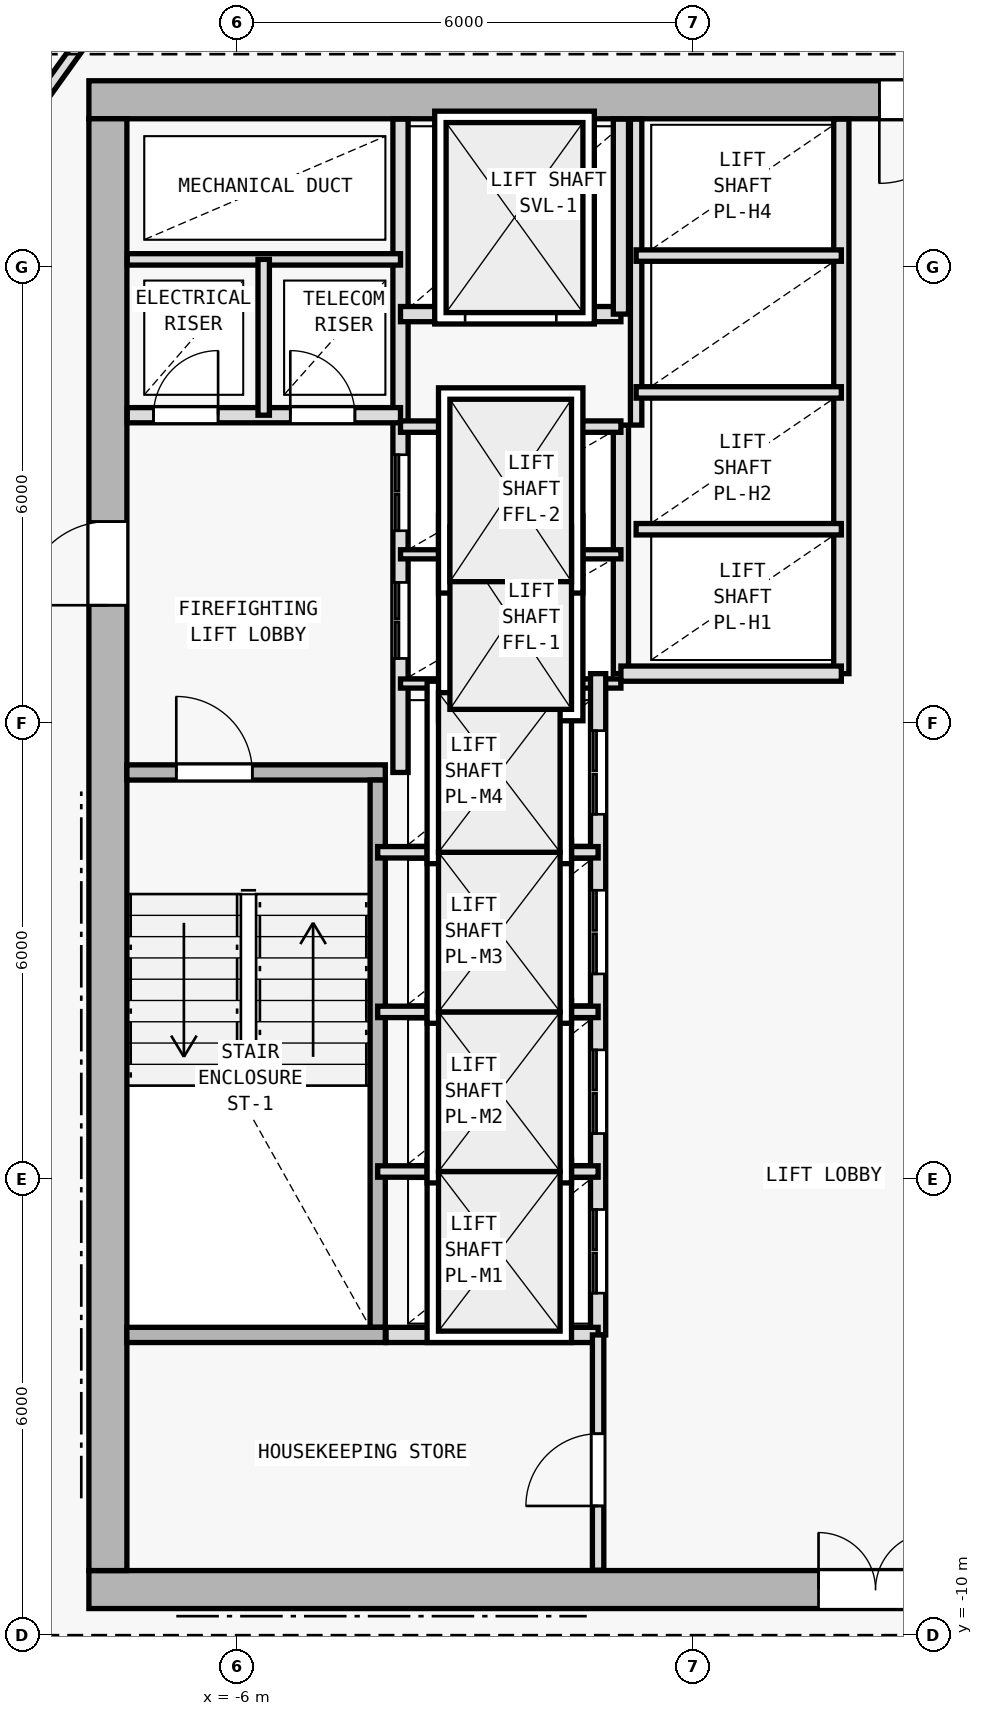
"""IFC4 building model, lengths in metres.
Left out: names, types, materials, properties, quantities, classifications, styles, units other than length and angle.
Written with IfcOpenShell. Run it as: python <this file> out.ifc"""

import sys

from ifc_helpers import new_model, si_unit, direction, frame, frame_2d, origin, origin_2d, place, context, subcontext, project, spatial, rectangle, i_section, extrude, element, fill, save


model = new_model("IFC4")
c1 = context("Model", 3, precision=1e-05, world=origin(), true_north=direction((0.0, 1.0)))
c2 = subcontext(c1, "Body", "Model", "MODEL_VIEW")
j1 = project(units=[si_unit("LENGTHUNIT", "METRE"), si_unit("PLANEANGLEUNIT", "RADIAN")], contexts=[c1])
p1 = place(None, origin())
s1 = spatial("IfcSite", under=j1, at=p1, CompositionType="ELEMENT")
p2 = place(p1, origin())
s2 = spatial("IfcBuilding", under=s1, at=p2, CompositionType="ELEMENT")
p3 = place(p2, frame((0.0, 0.0, 171.0)))
s3 = spatial("IfcBuildingStorey", under=s2, at=p3, CompositionType="ELEMENT", Elevation=171.0)
for number, where, z_axis, x_axis in (
    (1, (-7.7, -9.4, 0.0), (0.0, 0.0, 1.0), (1.0, 0.0, 0.0)),
    (2, (-7.7, 10.2, 0.0), (0.0, 0.0, 1.0), (1.0, 0.0, 0.0)),
    (3, (0.0, -9.4, 0.0), (0.0, 0.0, 1.0), (1.0, 0.0, 0.0)),
    (4, (-7.7, 2.0, 0.0), (0.0, 0.0, 1.0), (1.0, 0.0, 0.0)),
):
    element("IfcColumn", number, at=place(p3, frame(where, z_axis=z_axis, x_axis=x_axis)), inside=s3, PredefinedType="COLUMN", context=c2, shape_type="SweptSolid", body=[
        extrude(i_section(OverallWidth=0.404, OverallDepth=0.407, WebThickness=0.017, FlangeThickness=0.028, FilletRadius=0.015, at=origin_2d()), origin(), (0.0, 0.0, 1.0), 3.6),
    ])
p4 = place(p3, frame((-7.95, -9.4, 0.0), z_axis=(0.0, 0.0, 1.0), x_axis=(1.0, 0.0, 0.0)))
e5 = element("IfcWall", 5, at=p4, inside=s3, PredefinedType="SHEAR", context=c2, shape_type="SweptSolid", body=[
    extrude(rectangle(XDim=15.9, YDim=0.5, at=frame_2d((7.95, 0.0))), origin(), (0.0, 0.0, 1.0), 3.35),
])
p5 = place(p4, frame((9.6, 0.0, 0.0)))
e6 = element("IfcOpeningElement", 6, at=p5, cuts=e5, PredefinedType="OPENING", context=c2, shape_type="SweptSolid", body=[
    extrude(rectangle(XDim=1.5, YDim=2.2, at=frame_2d((0.75, 1.1))), frame((0.0, 0.26, 0.0), z_axis=(0.0, -1.0, 0.0), x_axis=(1.0, 0.0, 0.0)), (0.0, 0.0, 1.0), 0.52),
])
p6 = place(p3, frame((7.95, 10.2, 0.0), z_axis=(0.0, 0.0, 1.0), x_axis=(-1.0, 0.0, 0.0)))
e7 = element("IfcWall", 7, at=p6, inside=s3, PredefinedType="SHEAR", context=c2, shape_type="SweptSolid", body=[
    extrude(rectangle(XDim=15.9, YDim=0.5, at=frame_2d((7.95, 0.0))), origin(), (0.0, 0.0, 1.0), 3.35),
])
p7 = place(p6, frame((4.4, 0.0, 0.0)))
e8 = element("IfcOpeningElement", 8, at=p7, cuts=e7, PredefinedType="OPENING", context=c2, shape_type="SweptSolid", body=[
    extrude(rectangle(XDim=1.1, YDim=2.15, at=frame_2d((0.55, 1.075))), frame((0.0, 0.26, 0.0), z_axis=(0.0, -1.0, 0.0), x_axis=(1.0, 0.0, 0.0)), (0.0, 0.0, 1.0), 0.52),
])
p8 = place(p3, frame((-7.7, -9.15, 0.0), z_axis=(0.0, 0.0, 1.0), x_axis=(0.0, 1.0, 0.0)))
e9 = element("IfcWall", 9, at=p8, inside=s3, PredefinedType="SHEAR", context=c2, shape_type="SweptSolid", body=[
    extrude(rectangle(XDim=19.1, YDim=0.5, at=frame_2d((9.55, 0.0))), origin(), (0.0, 0.0, 1.0), 3.35),
])
p9 = place(p8, frame((12.7, 0.0, 0.0)))
e10 = element("IfcOpeningElement", 10, at=p9, cuts=e9, PredefinedType="OPENING", context=c2, shape_type="SweptSolid", body=[
    extrude(rectangle(XDim=1.1, YDim=2.15, at=frame_2d((0.55, 1.075))), frame((0.0, 0.26, 0.0), z_axis=(0.0, -1.0, 0.0), x_axis=(1.0, 0.0, 0.0)), (0.0, 0.0, 1.0), 0.52),
])
p10 = place(p3, frame((-7.45, 1.35, 0.0), z_axis=(0.0, 0.0, 1.0), x_axis=(1.0, 0.0, 0.0)))
e11 = element("IfcWall", 11, at=p10, inside=s3, PredefinedType="SOLIDWALL", context=c2, shape_type="SweptSolid", body=[
    extrude(rectangle(XDim=3.4, YDim=0.2, at=frame_2d((1.7, 0.0))), origin(), (0.0, 0.0, 1.0), 3.35),
])
p11 = place(p10, frame((0.65, 0.0, 0.0)))
e12 = element("IfcOpeningElement", 12, at=p11, cuts=e11, PredefinedType="OPENING", context=c2, shape_type="SweptSolid", body=[
    extrude(rectangle(XDim=1.0, YDim=2.15, at=frame_2d((0.5, 1.075))), frame((0.0, 0.11, 0.0), z_axis=(0.0, -1.0, 0.0), x_axis=(1.0, 0.0, 0.0)), (0.0, 0.0, 1.0), 0.22),
])
p12 = place(p3, frame((-4.15, -5.95, 0.0), z_axis=(0.0, 0.0, 1.0), x_axis=(0.0, 1.0, 0.0)))
e13 = element("IfcWall", 13, at=p12, inside=s3, PredefinedType="SOLIDWALL", context=c2, shape_type="SweptSolid", body=[
    extrude(rectangle(XDim=7.2, YDim=0.2, at=frame_2d((3.6, 0.0))), origin(), (0.0, 0.0, 1.0), 3.35),
])
p13 = place(p3, frame((-3.85, 1.35, 0.0), z_axis=(0.0, 0.0, 1.0), x_axis=(0.0, 1.0, 0.0)))
e14 = element("IfcWall", 14, at=p13, inside=s3, PredefinedType="SOLIDWALL", context=c2, shape_type="SweptSolid", body=[
    extrude(rectangle(XDim=8.595, YDim=0.2, at=frame_2d((4.297, 0.0))), origin(), (0.0, 0.0, 1.0), 3.35),
])
p14 = place(p13, frame((1.5, 0.0, 0.0)))
e15 = element("IfcOpeningElement", 15, at=p14, cuts=e14, PredefinedType="OPENING", context=c2, shape_type="SweptSolid", body=[
    extrude(rectangle(XDim=1.0, YDim=2.15, at=frame_2d((0.5, 1.075))), frame((0.0, 0.11, 0.0), z_axis=(0.0, -1.0, 0.0), x_axis=(1.0, 0.0, 0.0)), (0.0, 0.0, 1.0), 0.22),
])
p15 = place(p13, frame((3.18, 0.0, 0.0)))
e16 = element("IfcOpeningElement", 16, at=p15, cuts=e14, PredefinedType="OPENING", context=c2, shape_type="SweptSolid", body=[
    extrude(rectangle(XDim=1.0, YDim=2.15, at=frame_2d((0.5, 1.075))), frame((0.0, 0.11, 0.0), z_axis=(0.0, -1.0, 0.0), x_axis=(1.0, 0.0, 0.0)), (0.0, 0.0, 1.0), 0.22),
])
p16 = place(p3, frame((-7.445, 6.05, 0.0), z_axis=(0.0, 0.0, 1.0), x_axis=(1.0, 0.0, 0.0)))
e17 = element("IfcWall", 17, at=p16, inside=s3, PredefinedType="SOLIDWALL", context=c2, shape_type="SweptSolid", body=[
    extrude(rectangle(XDim=3.595, YDim=0.2, at=frame_2d((1.797, 0.0))), origin(), (0.0, 0.0, 1.0), 3.35),
])
p17 = place(p16, frame((0.345, 0.0, 0.0)))
e18 = element("IfcOpeningElement", 18, at=p17, cuts=e17, PredefinedType="OPENING", context=c2, shape_type="SweptSolid", body=[
    extrude(rectangle(XDim=0.85, YDim=2.1, at=frame_2d((0.425, 1.05))), frame((0.0, 0.11, 0.0), z_axis=(0.0, -1.0, 0.0), x_axis=(1.0, 0.0, 0.0)), (0.0, 0.0, 1.0), 0.22),
])
p18 = place(p16, frame((2.145, 0.0, 0.0)))
e19 = element("IfcOpeningElement", 19, at=p18, cuts=e17, PredefinedType="OPENING", context=c2, shape_type="SweptSolid", body=[
    extrude(rectangle(XDim=0.85, YDim=2.1, at=frame_2d((0.425, 1.05))), frame((0.0, 0.11, 0.0), z_axis=(0.0, -1.0, 0.0), x_axis=(1.0, 0.0, 0.0)), (0.0, 0.0, 1.0), 0.22),
])
p19 = place(p3, frame((-7.445, 8.1, 0.0), z_axis=(0.0, 0.0, 1.0), x_axis=(1.0, 0.0, 0.0)))
e20 = element("IfcWall", 20, at=p19, inside=s3, PredefinedType="PARTITIONING", context=c2, shape_type="SweptSolid", body=[
    extrude(rectangle(XDim=3.595, YDim=0.15, at=frame_2d((1.797, 0.0))), origin(), (0.0, 0.0, 1.0), 3.35),
])
p20 = place(p3, frame((-5.65, 6.05, 0.0), z_axis=(0.0, 0.0, 1.0), x_axis=(0.0, 1.0, 0.0)))
e21 = element("IfcWall", 21, at=p20, inside=s3, PredefinedType="PARTITIONING", context=c2, shape_type="SweptSolid", body=[
    extrude(rectangle(XDim=2.05, YDim=0.15, at=frame_2d((1.025, 0.0))), origin(), (0.0, 0.0, 1.0), 3.35),
])
p21 = place(p3, frame((-0.95, 2.65, 0.0), z_axis=(0.0, 0.0, 1.0), x_axis=(0.0, 1.0, 0.0)))
e22 = element("IfcWall", 22, at=p21, inside=s3, PredefinedType="SOLIDWALL", context=c2, shape_type="SweptSolid", body=[
    extrude(rectangle(XDim=3.27, YDim=0.2, at=frame_2d((1.635, 0.0))), origin(), (0.0, 0.0, 1.0), 3.35),
])
for number, where, z_axis, x_axis in (
    (23, (-3.85, 2.52, 0.0), (0.0, 0.0, 1.0), (1.0, 0.0, 0.0)),
    (24, (-3.85, 4.22, 0.0), (0.0, 0.0, 1.0), (1.0, 0.0, 0.0)),
):
    element("IfcWall", number, at=place(p3, frame(where, z_axis=z_axis, x_axis=x_axis)), inside=s3, PredefinedType="PARTITIONING", context=c2, shape_type="SweptSolid", body=[
        extrude(rectangle(XDim=2.9, YDim=0.12, at=frame_2d((1.45, 0.0))), origin(), (0.0, 0.0, 1.0), 3.35),
    ])
p22 = place(p3, frame((-3.85, 5.9, 0.0), z_axis=(0.0, 0.0, 1.0), x_axis=(1.0, 0.0, 0.0)))
e25 = element("IfcWall", 25, at=p22, inside=s3, PredefinedType="PARTITIONING", context=c2, shape_type="SweptSolid", body=[
    extrude(rectangle(XDim=2.9, YDim=0.15, at=frame_2d((1.45, 0.0))), origin(), (0.0, 0.0, 1.0), 3.35),
])
p23 = place(p3, frame((-3.85, 7.38, 0.0), z_axis=(0.0, 0.0, 1.0), x_axis=(1.0, 0.0, 0.0)))
e26 = element("IfcWall", 26, at=p23, inside=s3, PredefinedType="SOLIDWALL", context=c2, shape_type="SweptSolid", body=[
    extrude(rectangle(XDim=2.9, YDim=0.2, at=frame_2d((1.45, 0.0))), origin(), (0.0, 0.0, 1.0), 3.35),
])
p24 = place(p23, frame((0.85, 0.0, 0.0)))
e27 = element("IfcOpeningElement", 27, at=p24, cuts=e26, PredefinedType="OPENING", context=c2, shape_type="SweptSolid", body=[
    extrude(rectangle(XDim=1.2, YDim=2.2, at=frame_2d((0.6, 1.1))), frame((0.0, 0.11, 0.0), z_axis=(0.0, -1.0, 0.0), x_axis=(1.0, 0.0, 0.0)), (0.0, 0.0, 1.0), 0.22),
])
p25 = place(p3, frame((-0.95, 7.38, 0.0), z_axis=(0.0, 0.0, 1.0), x_axis=(0.0, 1.0, 0.0)))
e28 = element("IfcWall", 28, at=p25, inside=s3, PredefinedType="SOLIDWALL", context=c2, shape_type="SweptSolid", body=[
    extrude(rectangle(XDim=2.565, YDim=0.2, at=frame_2d((1.283, 0.0))), origin(), (0.0, 0.0, 1.0), 3.35),
])
p26 = place(p3, frame((-1.25, -6.05, 0.0), z_axis=(0.0, 0.0, 1.0), x_axis=(0.0, 1.0, 0.0)))
e29 = element("IfcWall", 29, at=p26, inside=s3, PredefinedType="SOLIDWALL", context=c2, shape_type="SweptSolid", body=[
    extrude(rectangle(XDim=8.7, YDim=0.2, at=frame_2d((4.35, 0.0))), origin(), (0.0, 0.0, 1.0), 3.35),
])
p27 = place(p26, frame((0.55, 0.0, 0.0)))
e30 = element("IfcOpeningElement", 30, at=p27, cuts=e29, PredefinedType="OPENING", context=c2, shape_type="SweptSolid", body=[
    extrude(rectangle(XDim=1.1, YDim=2.15, at=frame_2d((0.55, 1.075))), frame((0.0, 0.11, 0.0), z_axis=(0.0, -1.0, 0.0), x_axis=(1.0, 0.0, 0.0)), (0.0, 0.0, 1.0), 0.22),
])
p28 = place(p26, frame((2.65, 0.0, 0.0)))
e31 = element("IfcOpeningElement", 31, at=p28, cuts=e29, PredefinedType="OPENING", context=c2, shape_type="SweptSolid", body=[
    extrude(rectangle(XDim=1.1, YDim=2.15, at=frame_2d((0.55, 1.075))), frame((0.0, 0.11, 0.0), z_axis=(0.0, -1.0, 0.0), x_axis=(1.0, 0.0, 0.0)), (0.0, 0.0, 1.0), 0.22),
])
p29 = place(p26, frame((4.75, 0.0, 0.0)))
e32 = element("IfcOpeningElement", 32, at=p29, cuts=e29, PredefinedType="OPENING", context=c2, shape_type="SweptSolid", body=[
    extrude(rectangle(XDim=1.1, YDim=2.15, at=frame_2d((0.55, 1.075))), frame((0.0, 0.11, 0.0), z_axis=(0.0, -1.0, 0.0), x_axis=(1.0, 0.0, 0.0)), (0.0, 0.0, 1.0), 0.22),
])
p30 = place(p26, frame((6.85, 0.0, 0.0)))
e33 = element("IfcOpeningElement", 33, at=p30, cuts=e29, PredefinedType="OPENING", context=c2, shape_type="SweptSolid", body=[
    extrude(rectangle(XDim=1.1, YDim=2.15, at=frame_2d((0.55, 1.075))), frame((0.0, 0.11, 0.0), z_axis=(0.0, -1.0, 0.0), x_axis=(1.0, 0.0, 0.0)), (0.0, 0.0, 1.0), 0.22),
])
for number, where, z_axis, x_axis in (
    (34, (-4.15, -3.9, 0.0), (0.0, 0.0, 1.0), (1.0, 0.0, 0.0)),
    (35, (-4.15, -1.8, 0.0), (0.0, 0.0, 1.0), (1.0, 0.0, 0.0)),
    (36, (-4.15, 0.3, 0.0), (0.0, 0.0, 1.0), (1.0, 0.0, 0.0)),
):
    element("IfcWall", number, at=place(p3, frame(where, z_axis=z_axis, x_axis=x_axis)), inside=s3, PredefinedType="PARTITIONING", context=c2, shape_type="SweptSolid", body=[
        extrude(rectangle(XDim=2.9, YDim=0.15, at=frame_2d((1.45, 0.0))), origin(), (0.0, 0.0, 1.0), 3.35),
    ])
p31 = place(p3, frame((1.95, 2.65, 0.0), z_axis=(0.0, 0.0, 1.0), x_axis=(0.0, 1.0, 0.0)))
e37 = element("IfcWall", 37, at=p31, inside=s3, PredefinedType="SOLIDWALL", context=c2, shape_type="SweptSolid", body=[
    extrude(rectangle(XDim=7.295, YDim=0.2, at=frame_2d((3.647, 0.0))), origin(), (0.0, 0.0, 1.0), 3.35),
])
p32 = place(p3, frame((-0.95, 2.65, 0.0), z_axis=(0.0, 0.0, 1.0), x_axis=(1.0, 0.0, 0.0)))
e38 = element("IfcWall", 38, at=p32, inside=s3, PredefinedType="SOLIDWALL", context=c2, shape_type="SweptSolid", body=[
    extrude(rectangle(XDim=2.9, YDim=0.2, at=frame_2d((1.45, 0.0))), origin(), (0.0, 0.0, 1.0), 3.35),
])
p33 = place(p3, frame((-0.75, 5.92, 0.0), z_axis=(0.0, 0.0, 1.0), x_axis=(0.0, 1.0, 0.0)))
e39 = element("IfcWall", 39, at=p33, inside=s3, PredefinedType="PARTITIONING", context=c2, shape_type="SweptSolid", body=[
    extrude(rectangle(XDim=4.025, YDim=0.15, at=frame_2d((2.013, 0.0))), origin(), (0.0, 0.0, 1.0), 3.35),
])
for number, where, z_axis, x_axis in (
    (40, (-0.75, 4.55, 0.0), (0.0, 0.0, 1.0), (1.0, 0.0, 0.0)),
    (41, (-0.75, 6.35, 0.0), (0.0, 0.0, 1.0), (1.0, 0.0, 0.0)),
    (42, (-0.75, 8.15, 0.0), (0.0, 0.0, 1.0), (1.0, 0.0, 0.0)),
):
    element("IfcWall", number, at=place(p3, frame(where, z_axis=z_axis, x_axis=x_axis)), inside=s3, PredefinedType="PARTITIONING", context=c2, shape_type="SweptSolid", body=[
        extrude(rectangle(XDim=2.7, YDim=0.15, at=frame_2d((1.35, 0.0))), origin(), (0.0, 0.0, 1.0), 3.35),
    ])
p34 = place(p3, frame((-7.45, -6.05, 0.0), z_axis=(0.0, 0.0, 1.0), x_axis=(1.0, 0.0, 0.0)))
e43 = element("IfcWall", 43, at=p34, inside=s3, PredefinedType="SOLIDWALL", context=c2, shape_type="SweptSolid", body=[
    extrude(rectangle(XDim=3.4, YDim=0.2, at=frame_2d((1.7, 0.0))), origin(), (0.0, 0.0, 1.0), 3.35),
])
p35 = place(p3, frame((-4.04, -6.05, 0.0), z_axis=(0.0, 0.0, 1.0), x_axis=(1.0, 0.0, 0.0)))
e44 = element("IfcWall", 44, at=p35, inside=s3, PredefinedType="SOLIDWALL", context=c2, shape_type="SweptSolid", body=[
    extrude(rectangle(XDim=2.79, YDim=0.2, at=frame_2d((1.395, 0.0))), origin(), (0.0, 0.0, 1.0), 3.35),
])
p36 = place(p3, frame((-1.25, -9.145, 0.0), z_axis=(0.0, 0.0, 1.0), x_axis=(0.0, 1.0, 0.0)))
e45 = element("IfcWall", 45, at=p36, inside=s3, PredefinedType="PARTITIONING", context=c2, shape_type="SweptSolid", body=[
    extrude(rectangle(XDim=3.095, YDim=0.15, at=frame_2d((1.547, 0.0))), origin(), (0.0, 0.0, 1.0), 3.35),
])
p37 = place(p36, frame((0.845, 0.0, 0.0)))
e46 = element("IfcOpeningElement", 46, at=p37, cuts=e45, PredefinedType="OPENING", context=c2, shape_type="SweptSolid", body=[
    extrude(rectangle(XDim=0.95, YDim=2.1, at=frame_2d((0.475, 1.05))), frame((0.0, 0.085, 0.0), z_axis=(0.0, -1.0, 0.0), x_axis=(1.0, 0.0, 0.0)), (0.0, 0.0, 1.0), 0.17),
])
p38 = place(p3, frame((-9.86, 8.426, 0.0), z_axis=(0.0, 0.0, 1.0), x_axis=(0.582449511476, 0.812866881218, 0.0)))
e47 = element("IfcWall", 47, at=p38, inside=s3, PredefinedType="PARTITIONING", context=c2, shape_type="SweptSolid", body=[
    extrude(rectangle(XDim=4.84, YDim=0.15, at=frame_2d((2.42, 0.0))), origin(), (0.0, 0.0, 1.0), 2.965),
])
p39 = place(p5, origin())
e48 = element("IfcDoor", 48, at=p39, inside=s3, OperationType="DOUBLE_DOOR_SINGLE_SWING", PredefinedType="DOOR", context=c2, shape_type="SweptSolid", body=[
    extrude(rectangle(XDim=1.5, YDim=2.2, at=frame_2d((0.75, 1.1))), frame((0.0, 0.025, 0.0), z_axis=(0.0, -1.0, 0.0), x_axis=(1.0, 0.0, 0.0)), (0.0, 0.0, 1.0), 0.05),
])
fill(e6, e48)
p40 = place(p9, origin())
e49 = element("IfcDoor", 49, at=p40, inside=s3, OperationType="SINGLE_SWING_LEFT", PredefinedType="DOOR", context=c2, shape_type="SweptSolid", body=[
    extrude(rectangle(XDim=1.1, YDim=2.15, at=frame_2d((0.55, 1.075))), frame((0.0, 0.025, 0.0), z_axis=(0.0, -1.0, 0.0), x_axis=(1.0, 0.0, 0.0)), (0.0, 0.0, 1.0), 0.05),
])
fill(e10, e49)
p41 = place(p7, origin())
e50 = element("IfcDoor", 50, at=p41, inside=s3, OperationType="SINGLE_SWING_RIGHT", PredefinedType="DOOR", context=c2, shape_type="SweptSolid", body=[
    extrude(rectangle(XDim=1.1, YDim=2.15, at=frame_2d((0.55, 1.075))), frame((0.0, 0.025, 0.0), z_axis=(0.0, -1.0, 0.0), x_axis=(1.0, 0.0, 0.0)), (0.0, 0.0, 1.0), 0.05),
])
fill(e8, e50)
p42 = place(p11, origin())
e51 = element("IfcDoor", 51, at=p42, inside=s3, OperationType="SINGLE_SWING_LEFT", PredefinedType="DOOR", context=c2, shape_type="SweptSolid", body=[
    extrude(rectangle(XDim=1.0, YDim=2.15, at=frame_2d((0.5, 1.075))), frame((0.0, 0.025, 0.0), z_axis=(0.0, -1.0, 0.0), x_axis=(1.0, 0.0, 0.0)), (0.0, 0.0, 1.0), 0.05),
])
fill(e12, e51)
p43 = place(p17, origin())
e52 = element("IfcDoor", 52, at=p43, inside=s3, OperationType="SINGLE_SWING_RIGHT", PredefinedType="DOOR", context=c2, shape_type="SweptSolid", body=[
    extrude(rectangle(XDim=0.85, YDim=2.1, at=frame_2d((0.425, 1.05))), frame((0.0, 0.025, 0.0), z_axis=(0.0, -1.0, 0.0), x_axis=(1.0, 0.0, 0.0)), (0.0, 0.0, 1.0), 0.05),
])
fill(e18, e52)
p44 = place(p18, origin())
e53 = element("IfcDoor", 53, at=p44, inside=s3, OperationType="SINGLE_SWING_LEFT", PredefinedType="DOOR", context=c2, shape_type="SweptSolid", body=[
    extrude(rectangle(XDim=0.85, YDim=2.1, at=frame_2d((0.425, 1.05))), frame((0.0, 0.025, 0.0), z_axis=(0.0, -1.0, 0.0), x_axis=(1.0, 0.0, 0.0)), (0.0, 0.0, 1.0), 0.05),
])
fill(e19, e53)
p45 = place(p24, origin())
e54 = element("IfcDoor", 54, at=p45, inside=s3, OperationType="DOUBLE_DOOR_SLIDING", PredefinedType="DOOR", context=c2, shape_type="SweptSolid", body=[
    extrude(rectangle(XDim=1.2, YDim=2.2, at=frame_2d((0.6, 1.1))), frame((0.0, 0.025, 0.0), z_axis=(0.0, -1.0, 0.0), x_axis=(1.0, 0.0, 0.0)), (0.0, 0.0, 1.0), 0.05),
])
fill(e27, e54)
p46 = place(p27, origin())
e55 = element("IfcDoor", 55, at=p46, inside=s3, OperationType="DOUBLE_DOOR_SLIDING", PredefinedType="DOOR", context=c2, shape_type="SweptSolid", body=[
    extrude(rectangle(XDim=1.1, YDim=2.15, at=frame_2d((0.55, 1.075))), frame((0.0, 0.025, 0.0), z_axis=(0.0, -1.0, 0.0), x_axis=(1.0, 0.0, 0.0)), (0.0, 0.0, 1.0), 0.05),
])
fill(e30, e55)
p47 = place(p28, origin())
e56 = element("IfcDoor", 56, at=p47, inside=s3, OperationType="DOUBLE_DOOR_SLIDING", PredefinedType="DOOR", context=c2, shape_type="SweptSolid", body=[
    extrude(rectangle(XDim=1.1, YDim=2.15, at=frame_2d((0.55, 1.075))), frame((0.0, 0.025, 0.0), z_axis=(0.0, -1.0, 0.0), x_axis=(1.0, 0.0, 0.0)), (0.0, 0.0, 1.0), 0.05),
])
fill(e31, e56)
p48 = place(p29, origin())
e57 = element("IfcDoor", 57, at=p48, inside=s3, OperationType="DOUBLE_DOOR_SLIDING", PredefinedType="DOOR", context=c2, shape_type="SweptSolid", body=[
    extrude(rectangle(XDim=1.1, YDim=2.15, at=frame_2d((0.55, 1.075))), frame((0.0, 0.025, 0.0), z_axis=(0.0, -1.0, 0.0), x_axis=(1.0, 0.0, 0.0)), (0.0, 0.0, 1.0), 0.05),
])
fill(e32, e57)
p49 = place(p30, origin())
e58 = element("IfcDoor", 58, at=p49, inside=s3, OperationType="DOUBLE_DOOR_SLIDING", PredefinedType="DOOR", context=c2, shape_type="SweptSolid", body=[
    extrude(rectangle(XDim=1.1, YDim=2.15, at=frame_2d((0.55, 1.075))), frame((0.0, 0.025, 0.0), z_axis=(0.0, -1.0, 0.0), x_axis=(1.0, 0.0, 0.0)), (0.0, 0.0, 1.0), 0.05),
])
fill(e33, e58)
p50 = place(p14, origin())
e59 = element("IfcDoor", 59, at=p50, inside=s3, OperationType="DOUBLE_DOOR_SLIDING", PredefinedType="DOOR", context=c2, shape_type="SweptSolid", body=[
    extrude(rectangle(XDim=1.0, YDim=2.15, at=frame_2d((0.5, 1.075))), frame((0.0, 0.025, 0.0), z_axis=(0.0, -1.0, 0.0), x_axis=(1.0, 0.0, 0.0)), (0.0, 0.0, 1.0), 0.05),
])
fill(e15, e59)
p51 = place(p15, origin())
e60 = element("IfcDoor", 60, at=p51, inside=s3, OperationType="DOUBLE_DOOR_SLIDING", PredefinedType="DOOR", context=c2, shape_type="SweptSolid", body=[
    extrude(rectangle(XDim=1.0, YDim=2.15, at=frame_2d((0.5, 1.075))), frame((0.0, 0.025, 0.0), z_axis=(0.0, -1.0, 0.0), x_axis=(1.0, 0.0, 0.0)), (0.0, 0.0, 1.0), 0.05),
])
fill(e16, e60)
p52 = place(p37, origin())
e61 = element("IfcDoor", 61, at=p52, inside=s3, OperationType="SINGLE_SWING_LEFT", PredefinedType="DOOR", context=c2, shape_type="SweptSolid", body=[
    extrude(rectangle(XDim=0.95, YDim=2.1, at=frame_2d((0.475, 1.05))), frame((0.0, 0.025, 0.0), z_axis=(0.0, -1.0, 0.0), x_axis=(1.0, 0.0, 0.0)), (0.0, 0.0, 1.0), 0.05),
])
fill(e46, e61)
save(model, sys.argv[1])
